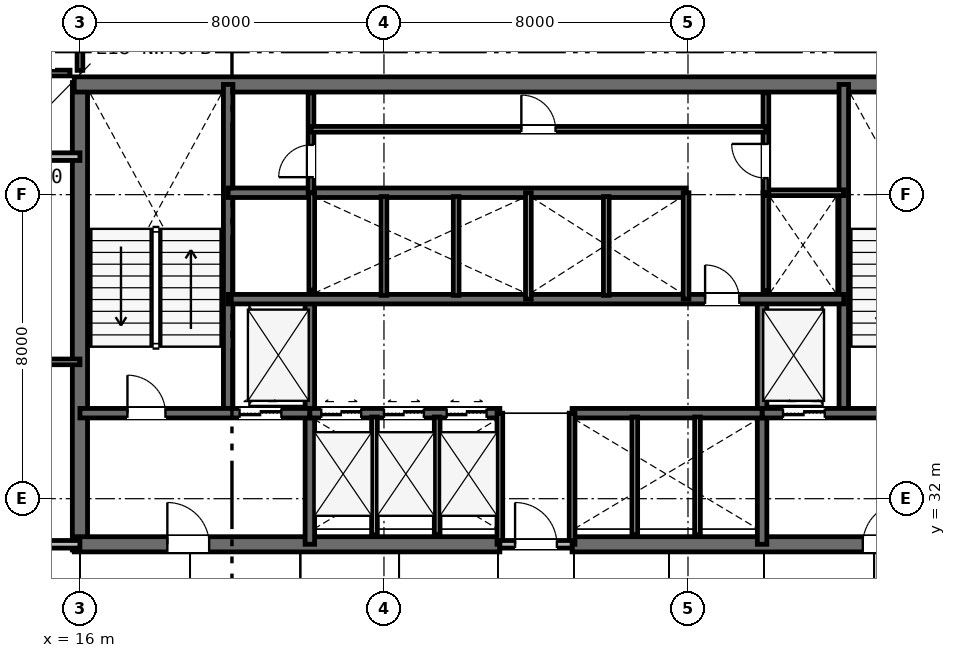
"""IFC4 building model, lengths in metres.
Left out: names, types, materials, properties, quantities, classifications, styles, units other than length and angle.
Written with IfcOpenShell. Run it as: python <this file> out.ifc"""

import sys

from ifc_helpers import new_model, si_unit, direction, frame, frame_2d, origin, place, context, subcontext, project, spatial, rectangle, extrude, element, fill, save


model = new_model("IFC4")
c1 = context("Model", 3, precision=1e-05, world=origin(), true_north=direction((0.0, 1.0)))
c2 = subcontext(c1, "Body", "Model", "MODEL_VIEW")
j1 = project(units=[si_unit("LENGTHUNIT", "METRE"), si_unit("PLANEANGLEUNIT", "RADIAN")], contexts=[c1])
p1 = place(None, origin())
s1 = spatial("IfcSite", under=j1, at=p1, CompositionType="ELEMENT")
p2 = place(p1, origin())
s2 = spatial("IfcBuilding", under=s1, at=p2, CompositionType="ELEMENT")
p3 = place(p2, frame((0.0, 0.0, 72.6)))
s3 = spatial("IfcBuildingStorey", under=s2, at=p3, CompositionType="ELEMENT", Elevation=72.6)
p4 = place(p3, frame((16.0, 30.65, 0.0), z_axis=(0.0, 0.0, 1.0), x_axis=(0.0, 1.0, 0.0)))
e1 = element("IfcWall", 1, at=p4, inside=s3, PredefinedType="SHEAR", context=c2, shape_type="SweptSolid", body=[
    extrude(rectangle(XDim=12.3, YDim=0.4, at=frame_2d((6.15, 0.0))), origin(), (0.0, 0.0, 1.0), 3.6),
])
p5 = place(p3, frame((15.85, 42.9, 0.0), z_axis=(0.0, 0.0, 1.0), x_axis=(1.0, 0.0, 0.0)))
e2 = element("IfcWall", 2, at=p5, inside=s3, PredefinedType="SHEAR", context=c2, shape_type="SweptSolid", body=[
    extrude(rectangle(XDim=24.3, YDim=0.4, at=frame_2d((12.15, 0.0))), origin(), (0.0, 0.0, 1.0), 3.6),
])
p6 = place(p3, frame((15.85, 30.8, 0.0), z_axis=(0.0, 0.0, 1.0), x_axis=(1.0, 0.0, 0.0)))
e3 = element("IfcWall", 3, at=p6, inside=s3, PredefinedType="SHEAR", context=c2, shape_type="SweptSolid", body=[
    extrude(rectangle(XDim=11.2, YDim=0.4, at=frame_2d((5.6, 0.0))), origin(), (0.0, 0.0, 1.0), 3.6),
])
p7 = place(p6, frame((2.45, 0.0, 0.0)))
e4 = element("IfcOpeningElement", 4, at=p7, cuts=e3, PredefinedType="OPENING", context=c2, shape_type="SweptSolid", body=[
    extrude(rectangle(XDim=1.1, YDim=2.15, at=frame_2d((0.55, 1.075))), frame((0.0, 0.21, 0.0), z_axis=(0.0, -1.0, 0.0), x_axis=(1.0, 0.0, 0.0)), (0.0, 0.0, 1.0), 0.42),
])
p8 = place(p3, frame((28.95, 30.8, 0.0), z_axis=(0.0, 0.0, 1.0), x_axis=(1.0, 0.0, 0.0)))
e5 = element("IfcWall", 5, at=p8, inside=s3, PredefinedType="SHEAR", context=c2, shape_type="SweptSolid", body=[
    extrude(rectangle(XDim=11.2, YDim=0.4, at=frame_2d((5.6, 0.0))), origin(), (0.0, 0.0, 1.0), 3.6),
])
p9 = place(p8, frame((7.65, 0.0, 0.0)))
e6 = element("IfcOpeningElement", 6, at=p9, cuts=e5, PredefinedType="OPENING", context=c2, shape_type="SweptSolid", body=[
    extrude(rectangle(XDim=1.1, YDim=2.15, at=frame_2d((0.55, 1.075))), frame((0.0, 0.21, 0.0), z_axis=(0.0, -1.0, 0.0), x_axis=(1.0, 0.0, 0.0)), (0.0, 0.0, 1.0), 0.42),
])
for number, where, z_axis, x_axis in (
    (7, (19.9, 34.25, 0.0), (0.0, 0.0, 1.0), (0.0, 1.0, 0.0)),
    (8, (36.1, 34.25, 0.0), (0.0, 0.0, 1.0), (0.0, 1.0, 0.0)),
):
    element("IfcWall", number, at=place(p3, frame(where, z_axis=z_axis, x_axis=x_axis)), inside=s3, PredefinedType="SHEAR", context=c2, shape_type="SweptSolid", body=[
        extrude(rectangle(XDim=8.65, YDim=0.25, at=frame_2d((4.325, 0.0))), origin(), (0.0, 0.0, 1.0), 3.6),
    ])
for number, where, z_axis, x_axis in (
    (9, (22.05, 30.8, 0.0), (0.0, 0.0, 1.0), (0.0, 1.0, 0.0)),
    (10, (33.95, 30.8, 0.0), (0.0, 0.0, 1.0), (0.0, 1.0, 0.0)),
):
    element("IfcWall", number, at=place(p3, frame(where, z_axis=z_axis, x_axis=x_axis)), inside=s3, PredefinedType="SHEAR", context=c2, shape_type="SweptSolid", body=[
        extrude(rectangle(XDim=6.45, YDim=0.25, at=frame_2d((3.225, 0.0))), origin(), (0.0, 0.0, 1.0), 3.6),
    ])
p10 = place(p3, frame((16.0, 34.25, 0.0), z_axis=(0.0, 0.0, 1.0), x_axis=(1.0, 0.0, 0.0)))
e11 = element("IfcWall", 11, at=p10, inside=s3, PredefinedType="SHEAR", context=c2, shape_type="SweptSolid", body=[
    extrude(rectangle(XDim=6.05, YDim=0.25, at=frame_2d((3.025, 0.0))), origin(), (0.0, 0.0, 1.0), 3.6),
])
p11 = place(p10, frame((1.25, 0.0, 0.0)))
e12 = element("IfcOpeningElement", 12, at=p11, cuts=e11, PredefinedType="OPENING", context=c2, shape_type="SweptSolid", body=[
    extrude(rectangle(XDim=1.0, YDim=2.15, at=frame_2d((0.5, 1.075))), frame((0.0, 0.135, 0.0), z_axis=(0.0, -1.0, 0.0), x_axis=(1.0, 0.0, 0.0)), (0.0, 0.0, 1.0), 0.27),
])
p12 = place(p10, frame((4.2, 0.0, 0.0)))
e13 = element("IfcOpeningElement", 13, at=p12, cuts=e11, PredefinedType="OPENING", context=c2, shape_type="SweptSolid", body=[
    extrude(rectangle(XDim=1.1, YDim=2.15, at=frame_2d((0.55, 1.075))), frame((0.0, 0.135, 0.0), z_axis=(0.0, -1.0, 0.0), x_axis=(1.0, 0.0, 0.0)), (0.0, 0.0, 1.0), 0.27),
])
p13 = place(p3, frame((33.95, 34.25, 0.0), z_axis=(0.0, 0.0, 1.0), x_axis=(1.0, 0.0, 0.0)))
e14 = element("IfcWall", 14, at=p13, inside=s3, PredefinedType="SHEAR", context=c2, shape_type="SweptSolid", body=[
    extrude(rectangle(XDim=6.05, YDim=0.25, at=frame_2d((3.025, 0.0))), origin(), (0.0, 0.0, 1.0), 3.6),
])
p14 = place(p13, frame((3.7, 0.0, 0.0)))
e15 = element("IfcOpeningElement", 15, at=p14, cuts=e14, PredefinedType="OPENING", context=c2, shape_type="SweptSolid", body=[
    extrude(rectangle(XDim=1.0, YDim=2.15, at=frame_2d((0.5, 1.075))), frame((0.0, 0.135, 0.0), z_axis=(0.0, -1.0, 0.0), x_axis=(1.0, 0.0, 0.0)), (0.0, 0.0, 1.0), 0.27),
])
p15 = place(p13, frame((0.55, 0.0, 0.0)))
e16 = element("IfcOpeningElement", 16, at=p15, cuts=e14, PredefinedType="OPENING", context=c2, shape_type="SweptSolid", body=[
    extrude(rectangle(XDim=1.1, YDim=2.15, at=frame_2d((0.55, 1.075))), frame((0.0, 0.135, 0.0), z_axis=(0.0, -1.0, 0.0), x_axis=(1.0, 0.0, 0.0)), (0.0, 0.0, 1.0), 0.27),
])
p16 = place(p3, frame((22.05, 34.25, 0.0), z_axis=(0.0, 0.0, 1.0), x_axis=(1.0, 0.0, 0.0)))
e17 = element("IfcWall", 17, at=p16, inside=s3, PredefinedType="SHEAR", context=c2, shape_type="SweptSolid", body=[
    extrude(rectangle(XDim=5.0, YDim=0.25, at=frame_2d((2.5, 0.0))), origin(), (0.0, 0.0, 1.0), 3.6),
])
p17 = place(p16, frame((0.3, 0.0, 0.0)))
e18 = element("IfcOpeningElement", 18, at=p17, cuts=e17, PredefinedType="OPENING", context=c2, shape_type="SweptSolid", body=[
    extrude(rectangle(XDim=1.05, YDim=2.15, at=frame_2d((0.525, 1.075))), frame((0.0, 0.135, 0.0), z_axis=(0.0, -1.0, 0.0), x_axis=(1.0, 0.0, 0.0)), (0.0, 0.0, 1.0), 0.27),
])
p18 = place(p16, frame((1.95, 0.0, 0.0)))
e19 = element("IfcOpeningElement", 19, at=p18, cuts=e17, PredefinedType="OPENING", context=c2, shape_type="SweptSolid", body=[
    extrude(rectangle(XDim=1.05, YDim=2.15, at=frame_2d((0.525, 1.075))), frame((0.0, 0.135, 0.0), z_axis=(0.0, -1.0, 0.0), x_axis=(1.0, 0.0, 0.0)), (0.0, 0.0, 1.0), 0.27),
])
p19 = place(p16, frame((3.6, 0.0, 0.0)))
e20 = element("IfcOpeningElement", 20, at=p19, cuts=e17, PredefinedType="OPENING", context=c2, shape_type="SweptSolid", body=[
    extrude(rectangle(XDim=1.05, YDim=2.15, at=frame_2d((0.525, 1.075))), frame((0.0, 0.135, 0.0), z_axis=(0.0, -1.0, 0.0), x_axis=(1.0, 0.0, 0.0)), (0.0, 0.0, 1.0), 0.27),
])
p20 = place(p3, frame((28.95, 34.25, 0.0), z_axis=(0.0, 0.0, 1.0), x_axis=(1.0, 0.0, 0.0)))
e21 = element("IfcWall", 21, at=p20, inside=s3, PredefinedType="SHEAR", context=c2, shape_type="SweptSolid", body=[
    extrude(rectangle(XDim=5.0, YDim=0.25, at=frame_2d((2.5, 0.0))), origin(), (0.0, 0.0, 1.0), 3.6),
])
p21 = place(p3, frame((19.9, 37.25, 0.0), z_axis=(0.0, 0.0, 1.0), x_axis=(1.0, 0.0, 0.0)))
e22 = element("IfcWall", 22, at=p21, inside=s3, PredefinedType="SHEAR", context=c2, shape_type="SweptSolid", body=[
    extrude(rectangle(XDim=16.2, YDim=0.25, at=frame_2d((8.1, 0.0))), origin(), (0.0, 0.0, 1.0), 3.6),
])
p22 = place(p21, frame((12.55, 0.0, 0.0)))
e23 = element("IfcOpeningElement", 23, at=p22, cuts=e22, PredefinedType="OPENING", context=c2, shape_type="SweptSolid", body=[
    extrude(rectangle(XDim=0.9, YDim=2.15, at=frame_2d((0.45, 1.075))), frame((0.0, 0.135, 0.0), z_axis=(0.0, -1.0, 0.0), x_axis=(1.0, 0.0, 0.0)), (0.0, 0.0, 1.0), 0.27),
])
p23 = place(p3, frame((19.9, 40.05, 0.0), z_axis=(0.0, 0.0, 1.0), x_axis=(1.0, 0.0, 0.0)))
e24 = element("IfcWall", 24, at=p23, inside=s3, PredefinedType="SHEAR", context=c2, shape_type="SweptSolid", body=[
    extrude(rectangle(XDim=12.05, YDim=0.25, at=frame_2d((6.025, 0.0))), origin(), (0.0, 0.0, 1.0), 3.6),
])
for number, where, z_axis, x_axis in (
    (25, (27.05, 30.8, 0.0), (0.0, 0.0, 1.0), (0.0, 1.0, 0.0)),
    (26, (28.95, 30.8, 0.0), (0.0, 0.0, 1.0), (0.0, 1.0, 0.0)),
):
    element("IfcWall", number, at=place(p3, frame(where, z_axis=z_axis, x_axis=x_axis)), inside=s3, PredefinedType="PLUMBINGWALL", context=c2, shape_type="SweptSolid", body=[
        extrude(rectangle(XDim=3.45, YDim=0.15, at=frame_2d((1.725, 0.0))), origin(), (0.0, 0.0, 1.0), 3.33),
    ])
p24 = place(p3, frame((27.05, 30.8, 0.0), z_axis=(0.0, 0.0, 1.0), x_axis=(1.0, 0.0, 0.0)))
e27 = element("IfcWall", 27, at=p24, inside=s3, PredefinedType="PARTITIONING", context=c2, shape_type="SweptSolid", body=[
    extrude(rectangle(XDim=1.9, YDim=0.2, at=frame_2d((0.95, 0.0))), origin(), (0.0, 0.0, 1.0), 3.33),
])
p25 = place(p24, frame((0.4, 0.0, 0.0)))
e28 = element("IfcOpeningElement", 28, at=p25, cuts=e27, PredefinedType="OPENING", context=c2, shape_type="SweptSolid", body=[
    extrude(rectangle(XDim=1.1, YDim=2.15, at=frame_2d((0.55, 1.075))), frame((0.0, 0.11, 0.0), z_axis=(0.0, -1.0, 0.0), x_axis=(1.0, 0.0, 0.0)), (0.0, 0.0, 1.0), 0.22),
])
for number, where, z_axis, x_axis in (
    (29, (23.75, 31.05, 0.0), (0.0, 0.0, 1.0), (0.0, 1.0, 0.0)),
    (30, (25.4, 31.05, 0.0), (0.0, 0.0, 1.0), (0.0, 1.0, 0.0)),
    (31, (30.6, 31.05, 0.0), (0.0, 0.0, 1.0), (0.0, 1.0, 0.0)),
    (32, (32.25, 31.05, 0.0), (0.0, 0.0, 1.0), (0.0, 1.0, 0.0)),
):
    element("IfcWall", number, at=place(p3, frame(where, z_axis=z_axis, x_axis=x_axis)), inside=s3, PredefinedType="PLUMBINGWALL", context=c2, shape_type="SweptSolid", body=[
        extrude(rectangle(XDim=3.1, YDim=0.15, at=frame_2d((1.55, 0.0))), origin(), (0.0, 0.0, 1.0), 3.33),
    ])
p26 = place(p3, frame((22.1, 37.49, 0.0), z_axis=(0.0, 0.0, 1.0), x_axis=(0.0, 1.0, 0.0)))
e33 = element("IfcWall", 33, at=p26, inside=s3, PredefinedType="PLUMBINGWALL", context=c2, shape_type="SweptSolid", body=[
    extrude(rectangle(XDim=2.56, YDim=0.15, at=frame_2d((1.28, 0.0))), origin(), (0.0, 0.0, 1.0), 3.33),
])
p27 = place(p3, frame((27.8, 37.25, 0.0), z_axis=(0.0, 0.0, 1.0), x_axis=(0.0, 1.0, 0.0)))
e34 = element("IfcWall", 34, at=p27, inside=s3, PredefinedType="PLUMBINGWALL", context=c2, shape_type="SweptSolid", body=[
    extrude(rectangle(XDim=2.8, YDim=0.15, at=frame_2d((1.4, 0.0))), origin(), (0.0, 0.0, 1.0), 3.33),
])
for number, where, z_axis, x_axis in (
    (35, (24.0, 37.35, 0.0), (0.0, 0.0, 1.0), (0.0, 1.0, 0.0)),
    (36, (25.9, 37.35, 0.0), (0.0, 0.0, 1.0), (0.0, 1.0, 0.0)),
):
    element("IfcWall", number, at=place(p3, frame(where, z_axis=z_axis, x_axis=x_axis)), inside=s3, PredefinedType="PLUMBINGWALL", context=c2, shape_type="SweptSolid", body=[
        extrude(rectangle(XDim=2.6, YDim=0.15, at=frame_2d((1.3, 0.0))), origin(), (0.0, 0.0, 1.0), 3.33),
    ])
p28 = place(p3, frame((31.95, 37.25, 0.0), z_axis=(0.0, 0.0, 1.0), x_axis=(0.0, 1.0, 0.0)))
e37 = element("IfcWall", 37, at=p28, inside=s3, PredefinedType="PLUMBINGWALL", context=c2, shape_type="SweptSolid", body=[
    extrude(rectangle(XDim=2.8, YDim=0.15, at=frame_2d((1.4, 0.0))), origin(), (0.0, 0.0, 1.0), 3.33),
])
p29 = place(p3, frame((29.85, 37.35, 0.0), z_axis=(0.0, 0.0, 1.0), x_axis=(0.0, 1.0, 0.0)))
e38 = element("IfcWall", 38, at=p29, inside=s3, PredefinedType="PLUMBINGWALL", context=c2, shape_type="SweptSolid", body=[
    extrude(rectangle(XDim=2.6, YDim=0.15, at=frame_2d((1.3, 0.0))), origin(), (0.0, 0.0, 1.0), 3.33),
])
p30 = place(p3, frame((34.05, 37.473, 0.0), z_axis=(0.0, 0.0, 1.0), x_axis=(0.0, 1.0, 0.0)))
e39 = element("IfcWall", 39, at=p30, inside=s3, PredefinedType="PLUMBINGWALL", context=c2, shape_type="SweptSolid", body=[
    extrude(rectangle(XDim=2.577, YDim=0.15, at=frame_2d((1.288, 0.0))), origin(), (0.0, 0.0, 1.0), 3.33),
])
p31 = place(p3, frame((34.05, 40.05, 0.0), z_axis=(0.0, 0.0, 1.0), x_axis=(1.0, 0.0, 0.0)))
e40 = element("IfcWall", 40, at=p31, inside=s3, PredefinedType="PARTITIONING", context=c2, shape_type="SweptSolid", body=[
    extrude(rectangle(XDim=2.05, YDim=0.15, at=frame_2d((1.025, 0.0))), origin(), (0.0, 0.0, 1.0), 3.33),
])
p32 = place(p3, frame((34.05, 40.05, 0.0), z_axis=(0.0, 0.0, 1.0), x_axis=(0.0, 1.0, 0.0)))
e41 = element("IfcWall", 41, at=p32, inside=s3, PredefinedType="PARTITIONING", context=c2, shape_type="SweptSolid", body=[
    extrude(rectangle(XDim=2.63, YDim=0.15, at=frame_2d((1.315, 0.0))), origin(), (0.0, 0.0, 1.0), 3.33),
])
p33 = place(p32, frame((0.385, 0.0, 0.0)))
e42 = element("IfcOpeningElement", 42, at=p33, cuts=e41, PredefinedType="OPENING", context=c2, shape_type="SweptSolid", body=[
    extrude(rectangle(XDim=0.9, YDim=2.15, at=frame_2d((0.45, 1.075))), frame((0.0, 0.085, 0.0), z_axis=(0.0, -1.0, 0.0), x_axis=(1.0, 0.0, 0.0)), (0.0, 0.0, 1.0), 0.17),
])
p34 = place(p3, frame((22.08, 40.05, 0.0), z_axis=(0.0, 0.0, 1.0), x_axis=(0.0, 1.0, 0.0)))
e43 = element("IfcWall", 43, at=p34, inside=s3, PredefinedType="PARTITIONING", context=c2, shape_type="SweptSolid", body=[
    extrude(rectangle(XDim=2.63, YDim=0.15, at=frame_2d((1.315, 0.0))), origin(), (0.0, 0.0, 1.0), 3.33),
])
p35 = place(p34, frame((0.41, 0.0, 0.0)))
e44 = element("IfcOpeningElement", 44, at=p35, cuts=e43, PredefinedType="OPENING", context=c2, shape_type="SweptSolid", body=[
    extrude(rectangle(XDim=0.85, YDim=2.15, at=frame_2d((0.425, 1.075))), frame((0.0, 0.085, 0.0), z_axis=(0.0, -1.0, 0.0), x_axis=(1.0, 0.0, 0.0)), (0.0, 0.0, 1.0), 0.17),
])
p36 = place(p3, frame((22.08, 41.72, 0.0), z_axis=(0.0, 0.0, 1.0), x_axis=(1.0, 0.0, 0.0)))
e45 = element("IfcWall", 45, at=p36, inside=s3, PredefinedType="PARTITIONING", context=c2, shape_type="SweptSolid", body=[
    extrude(rectangle(XDim=11.97, YDim=0.15, at=frame_2d((5.985, 0.0))), origin(), (0.0, 0.0, 1.0), 3.33),
])
p37 = place(p36, frame((5.535, 0.0, 0.0)))
e46 = element("IfcOpeningElement", 46, at=p37, cuts=e45, PredefinedType="OPENING", context=c2, shape_type="SweptSolid", body=[
    extrude(rectangle(XDim=0.9, YDim=2.15, at=frame_2d((0.45, 1.075))), frame((0.0, 0.085, 0.0), z_axis=(0.0, -1.0, 0.0), x_axis=(1.0, 0.0, 0.0)), (0.0, 0.0, 1.0), 0.17),
])
p38 = place(p3, frame((8.3, 35.6, 0.0), z_axis=(0.0, 0.0, 1.0), x_axis=(1.0, 0.0, 0.0)))
e47 = element("IfcWall", 47, at=p38, inside=s3, PredefinedType="PARTITIONING", context=c2, shape_type="SweptSolid", body=[
    extrude(rectangle(XDim=7.7, YDim=0.15, at=frame_2d((3.85, 0.0))), origin(), (0.0, 0.0, 1.0), 2.83),
])
p39 = place(p3, frame((8.3, 30.8, 0.0), z_axis=(0.0, 0.0, 1.0), x_axis=(1.0, 0.0, 0.0)))
e48 = element("IfcWall", 48, at=p39, inside=s3, PredefinedType="PARTITIONING", context=c2, shape_type="SweptSolid", body=[
    extrude(rectangle(XDim=7.7, YDim=0.2, at=frame_2d((3.85, 0.0))), origin(), (0.0, 0.0, 1.0), 2.83),
])
p40 = place(p39, frame((5.325, 0.0, 0.0)))
e49 = element("IfcOpeningElement", 49, at=p40, cuts=e48, PredefinedType="OPENING", context=c2, shape_type="SweptSolid", body=[
    extrude(rectangle(XDim=0.95, YDim=2.15, at=frame_2d((0.475, 1.075))), frame((0.0, 0.11, 0.0), z_axis=(0.0, -1.0, 0.0), x_axis=(1.0, 0.0, 0.0)), (0.0, 0.0, 1.0), 0.22),
])
p41 = place(p3, frame((0.1, 41.0, 0.0), z_axis=(0.0, 0.0, 1.0), x_axis=(1.0, 0.0, 0.0)))
e50 = element("IfcWall", 50, at=p41, inside=s3, PredefinedType="PARTITIONING", context=c2, shape_type="SweptSolid", body=[
    extrude(rectangle(XDim=15.9, YDim=0.2, at=frame_2d((7.95, 0.0))), origin(), (0.0, 0.0, 1.0), 2.83),
])
p42 = place(p41, frame((6.779, 0.0, 0.0)))
e51 = element("IfcOpeningElement", 51, at=p42, cuts=e50, PredefinedType="OPENING", context=c2, shape_type="SweptSolid", body=[
    extrude(rectangle(XDim=0.95, YDim=2.15, at=frame_2d((0.475, 1.075))), frame((0.0, 0.11, 0.0), z_axis=(0.0, -1.0, 0.0), x_axis=(1.0, 0.0, 0.0)), (0.0, 0.0, 1.0), 0.22),
])
p43 = place(p3, frame((13.55, 43.2, 0.0), z_axis=(0.0, 0.0, 1.0), x_axis=(1.0, 0.0, 0.0)))
e52 = element("IfcWall", 52, at=p43, inside=s3, PredefinedType="PARTITIONING", context=c2, shape_type="SweptSolid", body=[
    extrude(rectangle(XDim=2.19, YDim=0.15, at=frame_2d((1.095, 0.0))), origin(), (0.0, 0.0, 1.0), 3.33),
])
p44 = place(p3, frame((16.0, 43.27, 0.0), z_axis=(0.0, 0.0, 1.0), x_axis=(0.0, 1.0, 0.0)))
e53 = element("IfcWall", 53, at=p44, inside=s3, PredefinedType="PARTITIONING", context=c2, shape_type="SweptSolid", body=[
    extrude(rectangle(XDim=4.63, YDim=0.15, at=frame_2d((2.315, 0.0))), origin(), (0.0, 0.0, 1.0), 2.92),
])
p45 = place(p25, origin())
e54 = element("IfcDoor", 54, at=p45, inside=s3, OperationType="SINGLE_SWING_LEFT", PredefinedType="DOOR", context=c2, shape_type="SweptSolid", body=[
    extrude(rectangle(XDim=1.1, YDim=2.15, at=frame_2d((0.55, 1.075))), frame((0.0, 0.025, 0.0), z_axis=(0.0, -1.0, 0.0), x_axis=(1.0, 0.0, 0.0)), (0.0, 0.0, 1.0), 0.05),
])
fill(e28, e54)
p46 = place(p11, origin())
e55 = element("IfcDoor", 55, at=p46, inside=s3, OperationType="SINGLE_SWING_LEFT", PredefinedType="DOOR", context=c2, shape_type="SweptSolid", body=[
    extrude(rectangle(XDim=1.0, YDim=2.15, at=frame_2d((0.5, 1.075))), frame((0.0, 0.025, 0.0), z_axis=(0.0, -1.0, 0.0), x_axis=(1.0, 0.0, 0.0)), (0.0, 0.0, 1.0), 0.05),
])
fill(e12, e55)
p47 = place(p7, origin())
e56 = element("IfcDoor", 56, at=p47, inside=s3, OperationType="SINGLE_SWING_LEFT", PredefinedType="DOOR", context=c2, shape_type="SweptSolid", body=[
    extrude(rectangle(XDim=1.1, YDim=2.15, at=frame_2d((0.55, 1.075))), frame((0.0, 0.025, 0.0), z_axis=(0.0, -1.0, 0.0), x_axis=(1.0, 0.0, 0.0)), (0.0, 0.0, 1.0), 0.05),
])
fill(e4, e56)
p48 = place(p9, origin())
e57 = element("IfcDoor", 57, at=p48, inside=s3, OperationType="SINGLE_SWING_RIGHT", PredefinedType="DOOR", context=c2, shape_type="SweptSolid", body=[
    extrude(rectangle(XDim=1.1, YDim=2.15, at=frame_2d((0.55, 1.075))), frame((0.0, 0.025, 0.0), z_axis=(0.0, -1.0, 0.0), x_axis=(1.0, 0.0, 0.0)), (0.0, 0.0, 1.0), 0.05),
])
fill(e6, e57)
p49 = place(p22, origin())
e58 = element("IfcDoor", 58, at=p49, inside=s3, OperationType="SINGLE_SWING_LEFT", PredefinedType="DOOR", context=c2, shape_type="SweptSolid", body=[
    extrude(rectangle(XDim=0.9, YDim=2.15, at=frame_2d((0.45, 1.075))), frame((0.0, 0.025, 0.0), z_axis=(0.0, -1.0, 0.0), x_axis=(1.0, 0.0, 0.0)), (0.0, 0.0, 1.0), 0.05),
])
fill(e23, e58)
p50 = place(p33, origin())
e59 = element("IfcDoor", 59, at=p50, inside=s3, OperationType="SINGLE_SWING_RIGHT", PredefinedType="DOOR", context=c2, shape_type="SweptSolid", body=[
    extrude(rectangle(XDim=0.9, YDim=2.15, at=frame_2d((0.45, 1.075))), frame((0.0, 0.025, 0.0), z_axis=(0.0, -1.0, 0.0), x_axis=(1.0, 0.0, 0.0)), (0.0, 0.0, 1.0), 0.05),
])
fill(e42, e59)
p51 = place(p35, origin())
e60 = element("IfcDoor", 60, at=p51, inside=s3, OperationType="SINGLE_SWING_LEFT", PredefinedType="DOOR", context=c2, shape_type="SweptSolid", body=[
    extrude(rectangle(XDim=0.85, YDim=2.15, at=frame_2d((0.425, 1.075))), frame((0.0, 0.025, 0.0), z_axis=(0.0, -1.0, 0.0), x_axis=(1.0, 0.0, 0.0)), (0.0, 0.0, 1.0), 0.05),
])
fill(e44, e60)
p52 = place(p37, origin())
e61 = element("IfcDoor", 61, at=p52, inside=s3, OperationType="SINGLE_SWING_LEFT", PredefinedType="DOOR", context=c2, shape_type="SweptSolid", body=[
    extrude(rectangle(XDim=0.9, YDim=2.15, at=frame_2d((0.45, 1.075))), frame((0.0, 0.025, 0.0), z_axis=(0.0, -1.0, 0.0), x_axis=(1.0, 0.0, 0.0)), (0.0, 0.0, 1.0), 0.05),
])
fill(e46, e61)
p53 = place(p12, origin())
e62 = element("IfcDoor", 62, at=p53, inside=s3, OperationType="DOUBLE_DOOR_SLIDING", PredefinedType="DOOR", context=c2, shape_type="SweptSolid", body=[
    extrude(rectangle(XDim=1.1, YDim=2.15, at=frame_2d((0.55, 1.075))), frame((0.0, 0.025, 0.0), z_axis=(0.0, -1.0, 0.0), x_axis=(1.0, 0.0, 0.0)), (0.0, 0.0, 1.0), 0.05),
])
fill(e13, e62)
p54 = place(p15, origin())
e63 = element("IfcDoor", 63, at=p54, inside=s3, OperationType="DOUBLE_DOOR_SLIDING", PredefinedType="DOOR", context=c2, shape_type="SweptSolid", body=[
    extrude(rectangle(XDim=1.1, YDim=2.15, at=frame_2d((0.55, 1.075))), frame((0.0, 0.025, 0.0), z_axis=(0.0, -1.0, 0.0), x_axis=(1.0, 0.0, 0.0)), (0.0, 0.0, 1.0), 0.05),
])
fill(e16, e63)
p55 = place(p17, origin())
e64 = element("IfcDoor", 64, at=p55, inside=s3, OperationType="DOUBLE_DOOR_SLIDING", PredefinedType="DOOR", context=c2, shape_type="SweptSolid", body=[
    extrude(rectangle(XDim=1.05, YDim=2.15, at=frame_2d((0.525, 1.075))), frame((0.0, 0.025, 0.0), z_axis=(0.0, -1.0, 0.0), x_axis=(1.0, 0.0, 0.0)), (0.0, 0.0, 1.0), 0.05),
])
fill(e18, e64)
p56 = place(p18, origin())
e65 = element("IfcDoor", 65, at=p56, inside=s3, OperationType="DOUBLE_DOOR_SLIDING", PredefinedType="DOOR", context=c2, shape_type="SweptSolid", body=[
    extrude(rectangle(XDim=1.05, YDim=2.15, at=frame_2d((0.525, 1.075))), frame((0.0, 0.025, 0.0), z_axis=(0.0, -1.0, 0.0), x_axis=(1.0, 0.0, 0.0)), (0.0, 0.0, 1.0), 0.05),
])
fill(e19, e65)
p57 = place(p19, origin())
e66 = element("IfcDoor", 66, at=p57, inside=s3, OperationType="DOUBLE_DOOR_SLIDING", PredefinedType="DOOR", context=c2, shape_type="SweptSolid", body=[
    extrude(rectangle(XDim=1.05, YDim=2.15, at=frame_2d((0.525, 1.075))), frame((0.0, 0.025, 0.0), z_axis=(0.0, -1.0, 0.0), x_axis=(1.0, 0.0, 0.0)), (0.0, 0.0, 1.0), 0.05),
])
fill(e20, e66)
save(model, sys.argv[1])
